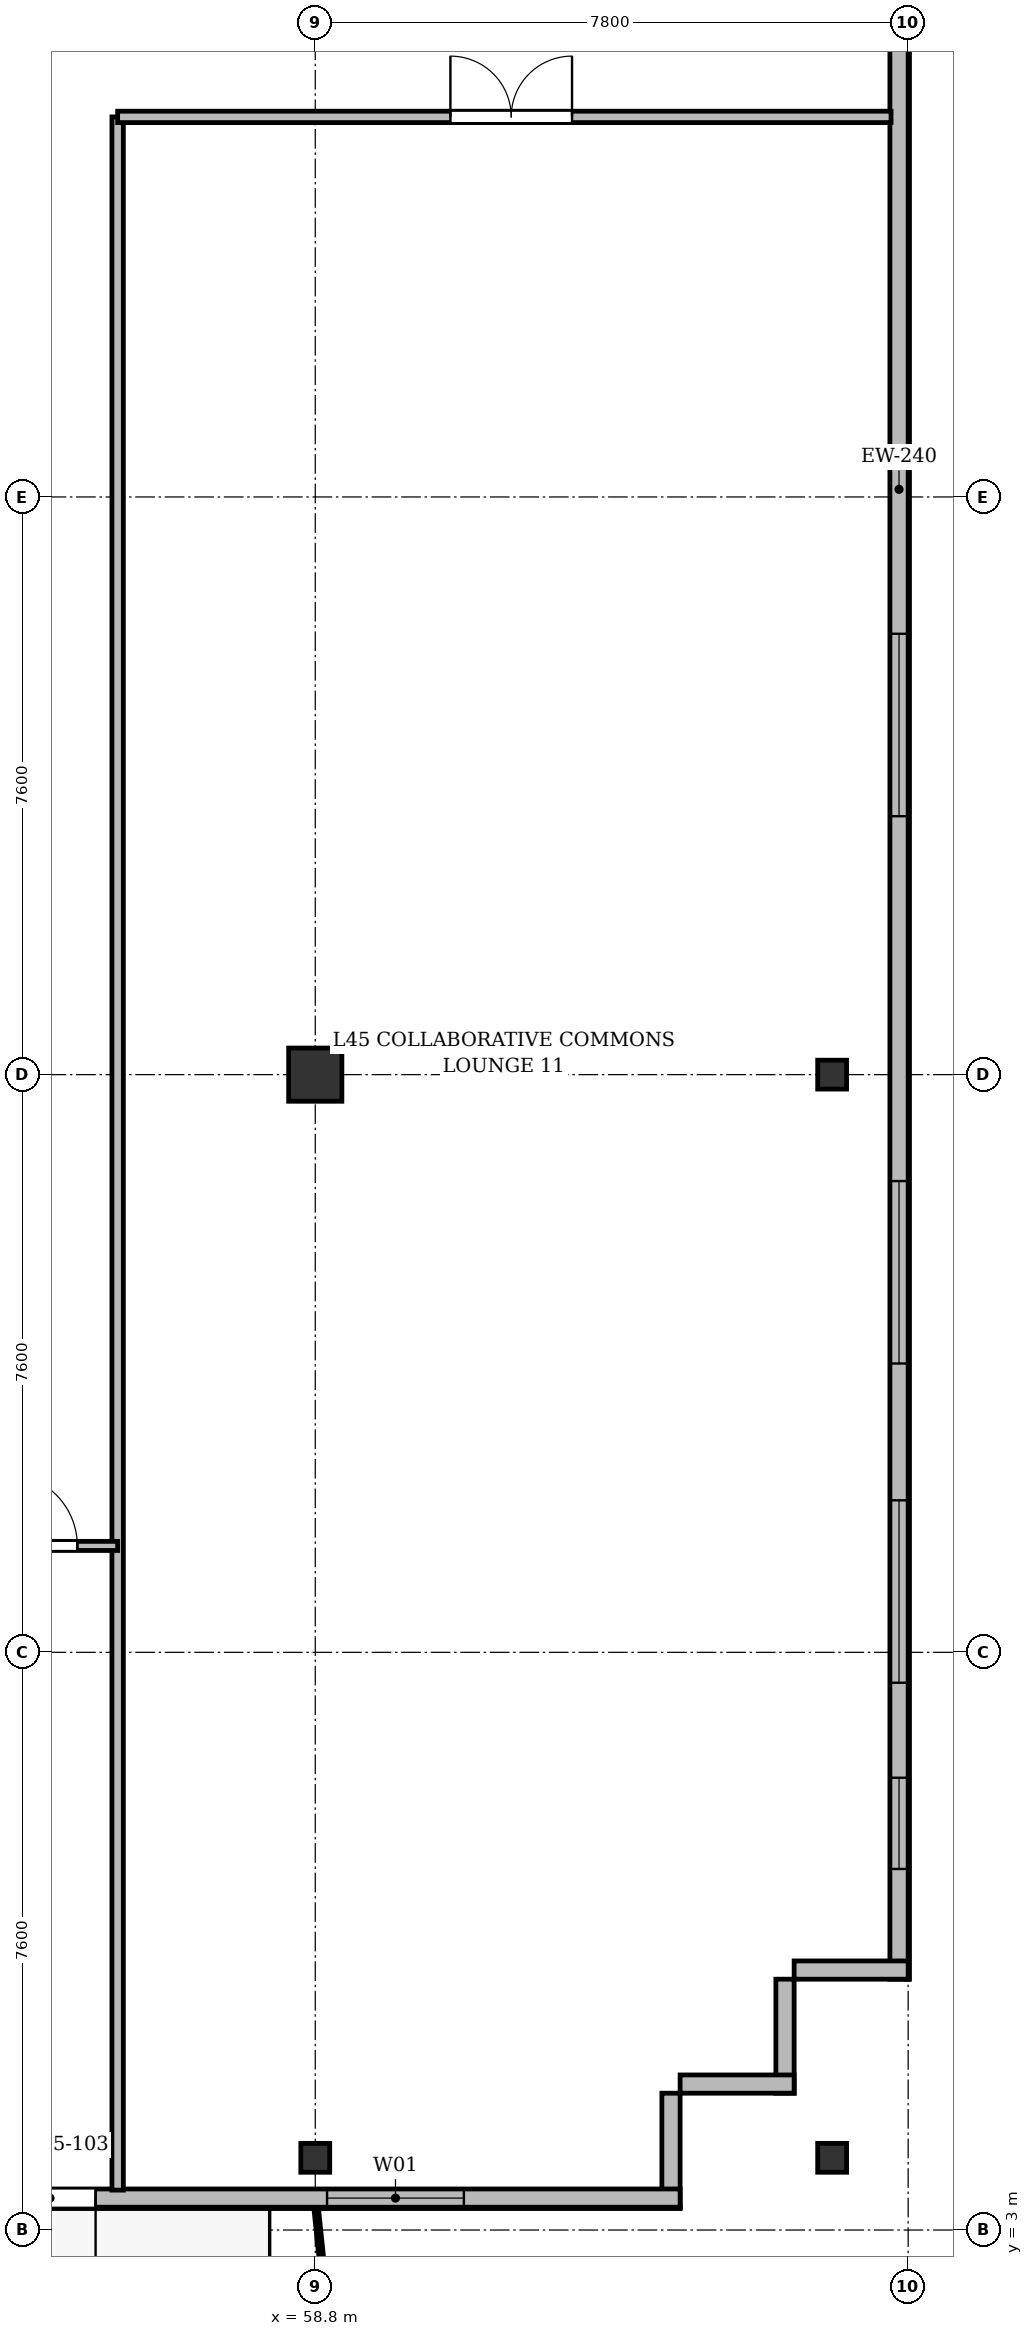
"""IFC4 building model, lengths in metres.
Left out: names, types, materials, properties, quantities, classifications, styles, units other than length and angle.
Written with IfcOpenShell. Run it as: python <this file> out.ifc"""

import sys

from ifc_helpers import new_model, si_unit, direction, frame, frame_2d, origin, origin_2d, place, context, subcontext, project, spatial, rectangle, i_section, extrude, source, transform, mapped, element, fill, save


model = new_model("IFC4")
c1 = context("Model", 3, precision=1e-05, world=origin(), true_north=direction((0.0, 1.0)))
c2 = subcontext(c1, "Body", "Model", "MODEL_VIEW")
j1 = project(units=[si_unit("LENGTHUNIT", "METRE"), si_unit("PLANEANGLEUNIT", "RADIAN")], contexts=[c1])
p1 = place(None, origin())
s1 = spatial("IfcSite", under=j1, at=p1, CompositionType="ELEMENT")
p2 = place(p1, origin())
s2 = spatial("IfcBuilding", under=s1, at=p2, CompositionType="ELEMENT")
p3 = place(p2, frame((0.0, 0.0, 171.7)))
s3 = spatial("IfcBuildingStorey", under=s2, at=p3, CompositionType="ELEMENT", Elevation=171.7)
m1 = source(origin(), c2, "Body", "SweptSolid", [
    extrude(i_section(OverallWidth=0.38, OverallDepth=0.38, WebThickness=0.02, FlangeThickness=0.03, at=origin_2d()), origin(), (0.0, 0.0, 1.0), 3.6),
])
p4 = place(p3, frame((58.8, 3.95, 0.0), z_axis=(0.0, 0.0, 1.0), x_axis=(1.0, 0.0, 0.0)))
e1 = element("IfcColumn", 1, at=p4, inside=s3, PredefinedType="COLUMN", context=c2, shape_type="MappedRepresentation", body=[
    mapped(m1, transform((0.0, 0.0, 0.0), x_axis=(1.0, 0.0, 0.0), y_axis=(0.0, 1.0, 0.0), z_axis=(0.0, 0.0, 1.0), scale=1.0)),
])
m2 = source(origin(), c2, "Body", "SweptSolid", [
    extrude(rectangle(XDim=0.7, YDim=0.7, at=origin_2d()), origin(), (0.0, 0.0, 1.0), 3.6),
])
p5 = place(p3, frame((58.8, 18.2, 0.0), z_axis=(0.0, 0.0, 1.0), x_axis=(1.0, 0.0, 0.0)))
e2 = element("IfcColumn", 2, at=p5, inside=s3, PredefinedType="COLUMN", context=c2, shape_type="MappedRepresentation", body=[
    mapped(m2, transform((0.0, 0.0, 0.0), x_axis=(1.0, 0.0, 0.0), y_axis=(0.0, 1.0, 0.0), z_axis=(0.0, 0.0, 1.0), scale=1.0)),
])
for number, where, z_axis, x_axis in (
    (3, (65.6, 3.95, 0.0), (0.0, 0.0, 1.0), (1.0, 0.0, 0.0)),
    (4, (65.6, 18.2, 0.0), (0.0, 0.0, 1.0), (1.0, 0.0, 0.0)),
):
    element("IfcColumn", number, at=place(p3, frame(where, z_axis=z_axis, x_axis=x_axis)), inside=s3, PredefinedType="COLUMN", context=c2, shape_type="MappedRepresentation", body=[
        mapped(m1, transform((0.0, 0.0, 0.0), x_axis=(1.0, 0.0, 0.0), y_axis=(0.0, 1.0, 0.0), z_axis=(0.0, 0.0, 1.0), scale=1.0)),
    ])
p6 = place(p3, frame((66.48, 45.5, 0.0), z_axis=(0.0, 0.0, 1.0), x_axis=(0.0, -1.0, 0.0)))
e5 = element("IfcWall", 5, at=p6, inside=s3, PredefinedType="SOLIDWALL", context=c2, shape_type="SweptSolid", body=[
    extrude(rectangle(XDim=39.2, YDim=0.24, at=frame_2d((19.6, 0.0))), origin(), (0.0, 0.0, 1.0), 3.35),
])
p7 = place(p6, frame((36.55, 0.0, 0.92)))
e6 = element("IfcOpeningElement", 6, at=p7, cuts=e5, PredefinedType="OPENING", context=c2, shape_type="SweptSolid", body=[
    extrude(rectangle(XDim=1.2, YDim=1.65, at=frame_2d((0.6, 0.825))), frame((0.0, 0.13, 0.0), z_axis=(0.0, -1.0, 0.0), x_axis=(1.0, 0.0, 0.0)), (0.0, 0.0, 1.0), 0.26),
])
p8 = place(p6, frame((32.9, 0.0, 0.92)))
e7 = element("IfcOpeningElement", 7, at=p8, cuts=e5, PredefinedType="OPENING", context=c2, shape_type="SweptSolid", body=[
    extrude(rectangle(XDim=2.4, YDim=2.1, at=frame_2d((1.2, 1.05))), frame((0.0, 0.13, 0.0), z_axis=(0.0, -1.0, 0.0), x_axis=(1.0, 0.0, 0.0)), (0.0, 0.0, 1.0), 0.26),
])
p9 = place(p6, frame((28.7, 0.0, 0.92)))
e8 = element("IfcOpeningElement", 8, at=p9, cuts=e5, PredefinedType="OPENING", context=c2, shape_type="SweptSolid", body=[
    extrude(rectangle(XDim=2.4, YDim=2.1, at=frame_2d((1.2, 1.05))), frame((0.0, 0.13, 0.0), z_axis=(0.0, -1.0, 0.0), x_axis=(1.0, 0.0, 0.0)), (0.0, 0.0, 1.0), 0.26),
])
p10 = place(p6, frame((21.5, 0.0, 0.92)))
e9 = element("IfcOpeningElement", 9, at=p10, cuts=e5, PredefinedType="OPENING", context=c2, shape_type="SweptSolid", body=[
    extrude(rectangle(XDim=2.4, YDim=2.1, at=frame_2d((1.2, 1.05))), frame((0.0, 0.13, 0.0), z_axis=(0.0, -1.0, 0.0), x_axis=(1.0, 0.0, 0.0)), (0.0, 0.0, 1.0), 0.26),
])
p11 = place(p6, frame((7.5, 0.0, 0.92)))
e10 = element("IfcOpeningElement", 10, at=p11, cuts=e5, PredefinedType="OPENING", context=c2, shape_type="SweptSolid", body=[
    extrude(rectangle(XDim=2.4, YDim=2.1, at=frame_2d((1.2, 1.05))), frame((0.0, 0.13, 0.0), z_axis=(0.0, -1.0, 0.0), x_axis=(1.0, 0.0, 0.0)), (0.0, 0.0, 1.0), 0.26),
])
p12 = place(p6, frame((4.5, 0.0, 0.92)))
e11 = element("IfcOpeningElement", 11, at=p12, cuts=e5, PredefinedType="OPENING", context=c2, shape_type="SweptSolid", body=[
    extrude(rectangle(XDim=1.2, YDim=1.65, at=frame_2d((0.6, 0.825))), frame((0.0, 0.13, 0.0), z_axis=(0.0, -1.0, 0.0), x_axis=(1.0, 0.0, 0.0)), (0.0, 0.0, 1.0), 0.26),
])
p13 = place(p6, frame((1.15, 0.0, 0.92)))
e12 = element("IfcOpeningElement", 12, at=p13, cuts=e5, PredefinedType="OPENING", context=c2, shape_type="SweptSolid", body=[
    extrude(rectangle(XDim=1.2, YDim=1.65, at=frame_2d((0.6, 0.825))), frame((0.0, 0.13, 0.0), z_axis=(0.0, -1.0, 0.0), x_axis=(1.0, 0.0, 0.0)), (0.0, 0.0, 1.0), 0.26),
])
p14 = place(p3, frame((66.6, 6.42, 0.0), z_axis=(0.0, 0.0, 1.0), x_axis=(-1.0, 0.0, 0.0)))
e13 = element("IfcWall", 13, at=p14, inside=s3, PredefinedType="SOLIDWALL", context=c2, shape_type="SweptSolid", body=[
    extrude(rectangle(XDim=1.5, YDim=0.24, at=frame_2d((0.75, 0.0))), origin(), (0.0, 0.0, 1.0), 2.85),
])
for number, where, z_axis, x_axis in (
    (14, (64.98, 6.3, 0.0), (0.0, 0.0, 1.0), (0.0, -1.0, 0.0)),
    (15, (65.1, 4.92, 0.0), (0.0, 0.0, 1.0), (-1.0, 0.0, 0.0)),
):
    element("IfcWall", number, at=place(p3, frame(where, z_axis=z_axis, x_axis=x_axis)), inside=s3, PredefinedType="SOLIDWALL", context=c2, shape_type="SweptSolid", body=[
        extrude(rectangle(XDim=1.5, YDim=0.24, at=frame_2d((0.75, 0.0))), origin(), (0.0, 0.0, 1.0), 3.35),
    ])
p15 = place(p3, frame((63.48, 4.8, 0.0), z_axis=(0.0, 0.0, 1.0), x_axis=(0.0, -1.0, 0.0)))
e16 = element("IfcWall", 16, at=p15, inside=s3, PredefinedType="SOLIDWALL", context=c2, shape_type="SweptSolid", body=[
    extrude(rectangle(XDim=1.5, YDim=0.24, at=frame_2d((0.75, 0.0))), origin(), (0.0, 0.0, 1.0), 2.75),
])
p16 = place(p3, frame((63.6, 3.42, 0.0), z_axis=(0.0, 0.0, 1.0), x_axis=(-1.0, 0.0, 0.0)))
e17 = element("IfcWall", 17, at=p16, inside=s3, PredefinedType="SOLIDWALL", context=c2, shape_type="SweptSolid", body=[
    extrude(rectangle(XDim=34.0, YDim=0.24, at=frame_2d((17.0, 0.0))), origin(), (0.0, 0.0, 1.0), 3.35),
])
p17 = place(p16, frame((2.845, 0.0, 0.9)))
e18 = element("IfcOpeningElement", 18, at=p17, cuts=e17, PredefinedType="OPENING", context=c2, shape_type="SweptSolid", body=[
    extrude(rectangle(XDim=1.8, YDim=1.8, at=frame_2d((0.9, 0.9))), frame((0.0, 0.13, 0.0), z_axis=(0.0, -1.0, 0.0), x_axis=(1.0, 0.0, 0.0)), (0.0, 0.0, 1.0), 0.26),
])
p18 = place(p16, frame((7.69, 0.0, 0.0)))
e19 = element("IfcOpeningElement", 19, at=p18, cuts=e17, PredefinedType="OPENING", context=c2, shape_type="SweptSolid", body=[
    extrude(rectangle(XDim=1.2, YDim=2.2, at=frame_2d((0.6, 1.1))), frame((0.0, 0.13, 0.0), z_axis=(0.0, -1.0, 0.0), x_axis=(1.0, 0.0, 0.0)), (0.0, 0.0, 1.0), 0.26),
])
p19 = place(p16, frame((10.25, 0.0, 0.9)))
e20 = element("IfcOpeningElement", 20, at=p19, cuts=e17, PredefinedType="OPENING", context=c2, shape_type="SweptSolid", body=[
    extrude(rectangle(XDim=1.5, YDim=1.75, at=frame_2d((0.75, 0.875))), frame((0.0, 0.13, 0.0), z_axis=(0.0, -1.0, 0.0), x_axis=(1.0, 0.0, 0.0)), (0.0, 0.0, 1.0), 0.26),
])
p20 = place(p16, frame((13.4, 0.0, 0.9)))
e21 = element("IfcOpeningElement", 21, at=p20, cuts=e17, PredefinedType="OPENING", context=c2, shape_type="SweptSolid", body=[
    extrude(rectangle(XDim=2.0, YDim=1.95, at=frame_2d((1.0, 0.975))), frame((0.0, 0.13, 0.0), z_axis=(0.0, -1.0, 0.0), x_axis=(1.0, 0.0, 0.0)), (0.0, 0.0, 1.0), 0.26),
])
p21 = place(p16, frame((17.175, 0.0, 0.9)))
e22 = element("IfcOpeningElement", 22, at=p21, cuts=e17, PredefinedType="OPENING", context=c2, shape_type="SweptSolid", body=[
    extrude(rectangle(XDim=1.65, YDim=1.85, at=frame_2d((0.825, 0.925))), frame((0.0, 0.13, 0.0), z_axis=(0.0, -1.0, 0.0), x_axis=(1.0, 0.0, 0.0)), (0.0, 0.0, 1.0), 0.26),
])
p22 = place(p16, frame((21.7, 0.0, 0.9)))
e23 = element("IfcOpeningElement", 23, at=p22, cuts=e17, PredefinedType="OPENING", context=c2, shape_type="SweptSolid", body=[
    extrude(rectangle(XDim=1.8, YDim=1.8, at=frame_2d((0.9, 0.9))), frame((0.0, 0.13, 0.0), z_axis=(0.0, -1.0, 0.0), x_axis=(1.0, 0.0, 0.0)), (0.0, 0.0, 1.0), 0.26),
])
p23 = place(p16, frame((28.1, 0.0, 0.9)))
e24 = element("IfcOpeningElement", 24, at=p23, cuts=e17, PredefinedType="OPENING", context=c2, shape_type="SweptSolid", body=[
    extrude(rectangle(XDim=2.2, YDim=1.8, at=frame_2d((1.1, 0.9))), frame((0.0, 0.13, 0.0), z_axis=(0.0, -1.0, 0.0), x_axis=(1.0, 0.0, 0.0)), (0.0, 0.0, 1.0), 0.26),
])
p24 = place(p3, frame((56.2, 3.525, 0.0), z_axis=(0.0, 0.0, 1.0), x_axis=(0.0, 1.0, 0.0)))
e25 = element("IfcWall", 25, at=p24, inside=s3, PredefinedType="PARTITIONING", context=c2, shape_type="SweptSolid", body=[
    extrude(rectangle(XDim=27.275, YDim=0.15, at=frame_2d((13.638, 0.0))), origin(), (0.0, 0.0, 1.0), 2.75),
])
p25 = place(p3, frame((54.2, 12.0, 0.0), z_axis=(0.0, 0.0, 1.0), x_axis=(1.0, 0.0, 0.0)))
e26 = element("IfcWall", 26, at=p25, inside=s3, PredefinedType="PARTITIONING", context=c2, shape_type="SweptSolid", body=[
    extrude(rectangle(XDim=2.0, YDim=0.12, at=frame_2d((1.0, 0.0))), origin(), (0.0, 0.0, 1.0), 3.35),
])
p26 = place(p25, frame((0.52, 0.0, 0.0)))
e27 = element("IfcOpeningElement", 27, at=p26, cuts=e26, PredefinedType="OPENING", context=c2, shape_type="SweptSolid", body=[
    extrude(rectangle(XDim=0.95, YDim=2.15, at=frame_2d((0.475, 1.075))), frame((0.0, 0.07, 0.0), z_axis=(0.0, -1.0, 0.0), x_axis=(1.0, 0.0, 0.0)), (0.0, 0.0, 1.0), 0.14),
])
p27 = place(p3, frame((56.2, 30.8, 0.0), z_axis=(0.0, 0.0, 1.0), x_axis=(1.0, 0.0, 0.0)))
e28 = element("IfcWall", 28, at=p27, inside=s3, PredefinedType="PARTITIONING", context=c2, shape_type="SweptSolid", body=[
    extrude(rectangle(XDim=10.175, YDim=0.15, at=frame_2d((5.087, 0.0))), origin(), (0.0, 0.0, 1.0), 2.85),
])
p28 = place(p27, frame((4.378, 0.0, 0.0)))
e29 = element("IfcOpeningElement", 29, at=p28, cuts=e28, PredefinedType="OPENING", context=c2, shape_type="SweptSolid", body=[
    extrude(rectangle(XDim=1.6, YDim=2.2, at=frame_2d((0.8, 1.1))), frame((0.0, 0.085, 0.0), z_axis=(0.0, -1.0, 0.0), x_axis=(1.0, 0.0, 0.0)), (0.0, 0.0, 1.0), 0.17),
])
m3 = source(origin(), c2, "Body", "SweptSolid", [
    extrude(rectangle(XDim=1.2, YDim=1.65, at=frame_2d((0.6, 0.825))), frame((0.0, 0.03, 0.0), z_axis=(0.0, -1.0, 0.0), x_axis=(1.0, 0.0, 0.0)), (0.0, 0.0, 1.0), 0.06),
])
p29 = place(p7, origin())
e30 = element("IfcWindow", 30, at=p29, inside=s3, PartitioningType="SINGLE_PANEL", PredefinedType="WINDOW", context=c2, shape_type="MappedRepresentation", body=[
    mapped(m3, transform((0.0, 0.0, 0.0), x_axis=(1.0, 0.0, 0.0), y_axis=(0.0, 1.0, 0.0), z_axis=(0.0, 0.0, 1.0), scale=1.0)),
])
fill(e6, e30)
m4 = source(origin(), c2, "Body", "SweptSolid", [
    extrude(rectangle(XDim=2.4, YDim=2.1, at=frame_2d((1.2, 1.05))), frame((0.0, 0.03, 0.0), z_axis=(0.0, -1.0, 0.0), x_axis=(1.0, 0.0, 0.0)), (0.0, 0.0, 1.0), 0.06),
])
p30 = place(p8, origin())
e31 = element("IfcWindow", 31, at=p30, inside=s3, PartitioningType="SINGLE_PANEL", PredefinedType="WINDOW", context=c2, shape_type="MappedRepresentation", body=[
    mapped(m4, transform((0.0, 0.0, 0.0), x_axis=(1.0, 0.0, 0.0), y_axis=(0.0, 1.0, 0.0), z_axis=(0.0, 0.0, 1.0), scale=1.0)),
])
fill(e7, e31)
p31 = place(p9, origin())
e32 = element("IfcWindow", 32, at=p31, inside=s3, PartitioningType="SINGLE_PANEL", PredefinedType="WINDOW", context=c2, shape_type="MappedRepresentation", body=[
    mapped(m4, transform((0.0, 0.0, 0.0), x_axis=(1.0, 0.0, 0.0), y_axis=(0.0, 1.0, 0.0), z_axis=(0.0, 0.0, 1.0), scale=1.0)),
])
fill(e8, e32)
p32 = place(p10, origin())
e33 = element("IfcWindow", 33, at=p32, inside=s3, PartitioningType="SINGLE_PANEL", PredefinedType="WINDOW", context=c2, shape_type="MappedRepresentation", body=[
    mapped(m4, transform((0.0, 0.0, 0.0), x_axis=(1.0, 0.0, 0.0), y_axis=(0.0, 1.0, 0.0), z_axis=(0.0, 0.0, 1.0), scale=1.0)),
])
fill(e9, e33)
m5 = source(origin(), c2, "Body", "SweptSolid", [
    extrude(rectangle(XDim=1.8, YDim=1.8, at=frame_2d((0.9, 0.9))), frame((0.0, 0.03, 0.0), z_axis=(0.0, -1.0, 0.0), x_axis=(1.0, 0.0, 0.0)), (0.0, 0.0, 1.0), 0.06),
])
p33 = place(p17, origin())
e34 = element("IfcWindow", 34, at=p33, inside=s3, PartitioningType="SINGLE_PANEL", PredefinedType="WINDOW", context=c2, shape_type="MappedRepresentation", body=[
    mapped(m5, transform((0.0, 0.0, 0.0), x_axis=(1.0, 0.0, 0.0), y_axis=(0.0, 1.0, 0.0), z_axis=(0.0, 0.0, 1.0), scale=1.0)),
])
fill(e18, e34)
m6 = source(origin(), c2, "Body", "SweptSolid", [
    extrude(rectangle(XDim=1.2, YDim=2.2, at=frame_2d((0.6, 1.1))), frame((0.0, 0.025, 0.0), z_axis=(0.0, -1.0, 0.0), x_axis=(1.0, 0.0, 0.0)), (0.0, 0.0, 1.0), 0.05),
])
p34 = place(p18, origin())
e35 = element("IfcDoor", 35, at=p34, inside=s3, OperationType="SINGLE_SWING_LEFT", PredefinedType="DOOR", context=c2, shape_type="MappedRepresentation", body=[
    mapped(m6, transform((0.0, 0.0, 0.0), x_axis=(1.0, 0.0, 0.0), y_axis=(0.0, 1.0, 0.0), z_axis=(0.0, 0.0, 1.0), scale=1.0)),
])
fill(e19, e35)
m7 = source(origin(), c2, "Body", "SweptSolid", [
    extrude(rectangle(XDim=0.95, YDim=2.15, at=frame_2d((0.475, 1.075))), frame((0.0, 0.025, 0.0), z_axis=(0.0, -1.0, 0.0), x_axis=(1.0, 0.0, 0.0)), (0.0, 0.0, 1.0), 0.05),
])
p35 = place(p26, origin())
e36 = element("IfcDoor", 36, at=p35, inside=s3, OperationType="SINGLE_SWING_LEFT", PredefinedType="DOOR", context=c2, shape_type="MappedRepresentation", body=[
    mapped(m7, transform((0.0, 0.0, 0.0), x_axis=(1.0, 0.0, 0.0), y_axis=(0.0, 1.0, 0.0), z_axis=(0.0, 0.0, 1.0), scale=1.0)),
])
fill(e27, e36)
m8 = source(origin(), c2, "Body", "SweptSolid", [
    extrude(rectangle(XDim=1.6, YDim=2.2, at=frame_2d((0.8, 1.1))), frame((0.0, 0.025, 0.0), z_axis=(0.0, -1.0, 0.0), x_axis=(1.0, 0.0, 0.0)), (0.0, 0.0, 1.0), 0.05),
])
p36 = place(p28, origin())
e37 = element("IfcDoor", 37, at=p36, inside=s3, OperationType="DOUBLE_DOOR_SINGLE_SWING", PredefinedType="DOOR", context=c2, shape_type="MappedRepresentation", body=[
    mapped(m8, transform((0.0, 0.0, 0.0), x_axis=(1.0, 0.0, 0.0), y_axis=(0.0, 1.0, 0.0), z_axis=(0.0, 0.0, 1.0), scale=1.0)),
])
fill(e29, e37)
save(model, sys.argv[1])
